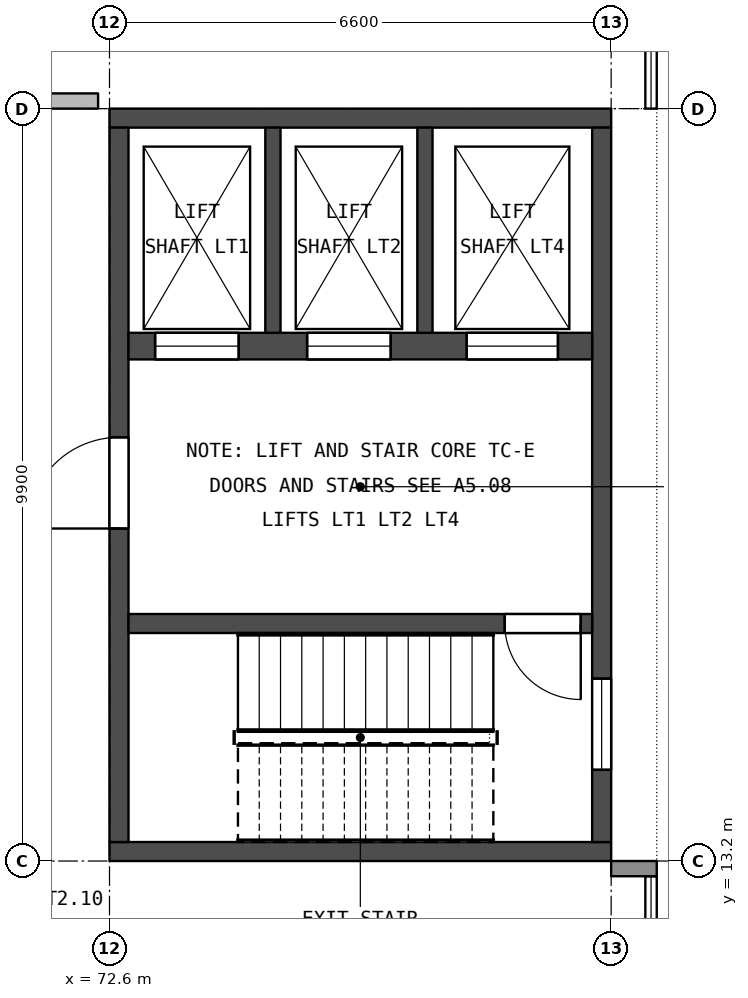
"""IFC4 building model, lengths in metres.
Left out: names, types, materials, properties, quantities, classifications, styles, units other than length and angle.
Written with IfcOpenShell. Run it as: python <this file> out.ifc"""

import sys

from ifc_helpers import new_model, si_unit, direction, frame, frame_2d, origin, place, context, subcontext, project, spatial, rectangle, extrude, element, fill, save


model = new_model("IFC4")
c1 = context("Model", 3, precision=1e-05, world=origin(), true_north=direction((0.0, 1.0)))
c2 = subcontext(c1, "Body", "Model", "MODEL_VIEW")
j1 = project(units=[si_unit("LENGTHUNIT", "METRE"), si_unit("PLANEANGLEUNIT", "RADIAN")], contexts=[c1])
p1 = place(None, origin())
s1 = spatial("IfcSite", under=j1, at=p1, CompositionType="ELEMENT")
p2 = place(p1, origin())
s2 = spatial("IfcBuilding", under=s1, at=p2, CompositionType="ELEMENT")
p3 = place(p2, frame((0.0, 0.0, 9.9)))
s3 = spatial("IfcBuildingStorey", under=s2, at=p3, CompositionType="ELEMENT", Elevation=9.9)
for number, where, z_axis, x_axis in (
    (1, (72.6, 13.325, 0.0), (0.0, 0.0, 1.0), (1.0, 0.0, 0.0)),
    (2, (72.6, 22.975, 0.0), (0.0, 0.0, 1.0), (1.0, 0.0, 0.0)),
):
    element("IfcWall", number, at=place(p3, frame(where, z_axis=z_axis, x_axis=x_axis)), inside=s3, PredefinedType="SHEAR", context=c2, shape_type="SweptSolid", body=[
        extrude(rectangle(XDim=6.6, YDim=0.25, at=frame_2d((3.3, 0.0))), origin(), (0.0, 0.0, 1.0), 4.2),
    ])
p4 = place(p3, frame((72.725, 13.45, 0.0), z_axis=(0.0, 0.0, 1.0), x_axis=(0.0, 1.0, 0.0)))
e3 = element("IfcWall", 3, at=p4, inside=s3, PredefinedType="SHEAR", context=c2, shape_type="SweptSolid", body=[
    extrude(rectangle(XDim=9.4, YDim=0.25, at=frame_2d((4.7, 0.0))), origin(), (0.0, 0.0, 1.0), 4.2),
])
p5 = place(p4, frame((4.125, 0.0, 0.0)))
e4 = element("IfcOpeningElement", 4, at=p5, cuts=e3, PredefinedType="OPENING", context=c2, shape_type="SweptSolid", body=[
    extrude(rectangle(XDim=1.2, YDim=2.1, at=frame_2d((0.6, 1.05))), frame((0.0, 0.135, 0.0), z_axis=(0.0, -1.0, 0.0), x_axis=(1.0, 0.0, 0.0)), (0.0, 0.0, 1.0), 0.27),
])
p6 = place(p3, frame((79.075, 13.45, 0.0), z_axis=(0.0, 0.0, 1.0), x_axis=(0.0, 1.0, 0.0)))
e5 = element("IfcWall", 5, at=p6, inside=s3, PredefinedType="SHEAR", context=c2, shape_type="SweptSolid", body=[
    extrude(rectangle(XDim=9.4, YDim=0.25, at=frame_2d((4.7, 0.0))), origin(), (0.0, 0.0, 1.0), 4.2),
])
p7 = place(p6, frame((0.95, 0.0, 0.7)))
e6 = element("IfcOpeningElement", 6, at=p7, cuts=e5, PredefinedType="OPENING", context=c2, shape_type="SweptSolid", body=[
    extrude(rectangle(XDim=1.2, YDim=1.8, at=frame_2d((0.6, 0.9))), frame((0.0, 0.135, 0.0), z_axis=(0.0, -1.0, 0.0), x_axis=(1.0, 0.0, 0.0)), (0.0, 0.0, 1.0), 0.27),
])
p8 = place(p3, frame((72.85, 16.325, 0.0), z_axis=(0.0, 0.0, 1.0), x_axis=(1.0, 0.0, 0.0)))
e7 = element("IfcWall", 7, at=p8, inside=s3, PredefinedType="SHEAR", context=c2, shape_type="SweptSolid", body=[
    extrude(rectangle(XDim=6.1, YDim=0.25, at=frame_2d((3.05, 0.0))), origin(), (0.0, 0.0, 1.0), 4.2),
])
p9 = place(p8, frame((4.95, 0.0, 0.0)))
e8 = element("IfcOpeningElement", 8, at=p9, cuts=e7, PredefinedType="OPENING", context=c2, shape_type="SweptSolid", body=[
    extrude(rectangle(XDim=1.0, YDim=2.2, at=frame_2d((0.5, 1.1))), frame((0.0, 0.135, 0.0), z_axis=(0.0, -1.0, 0.0), x_axis=(1.0, 0.0, 0.0)), (0.0, 0.0, 1.0), 0.27),
])
p10 = place(p3, frame((72.85, 19.975, 0.0), z_axis=(0.0, 0.0, 1.0), x_axis=(1.0, 0.0, 0.0)))
e9 = element("IfcWall", 9, at=p10, inside=s3, PredefinedType="SHEAR", context=c2, shape_type="SweptSolid", body=[
    extrude(rectangle(XDim=6.1, YDim=0.35, at=frame_2d((3.05, 0.0))), origin(), (0.0, 0.0, 1.0), 4.2),
])
p11 = place(p10, frame((0.35, 0.0, 0.0)))
e10 = element("IfcOpeningElement", 10, at=p11, cuts=e9, PredefinedType="OPENING", context=c2, shape_type="SweptSolid", body=[
    extrude(rectangle(XDim=1.1, YDim=2.2, at=frame_2d((0.55, 1.1))), frame((0.0, 0.185, 0.0), z_axis=(0.0, -1.0, 0.0), x_axis=(1.0, 0.0, 0.0)), (0.0, 0.0, 1.0), 0.37),
])
p12 = place(p10, frame((2.35, 0.0, 0.0)))
e11 = element("IfcOpeningElement", 11, at=p12, cuts=e9, PredefinedType="OPENING", context=c2, shape_type="SweptSolid", body=[
    extrude(rectangle(XDim=1.1, YDim=2.2, at=frame_2d((0.55, 1.1))), frame((0.0, 0.185, 0.0), z_axis=(0.0, -1.0, 0.0), x_axis=(1.0, 0.0, 0.0)), (0.0, 0.0, 1.0), 0.37),
])
p13 = place(p10, frame((4.45, 0.0, 0.0)))
e12 = element("IfcOpeningElement", 12, at=p13, cuts=e9, PredefinedType="OPENING", context=c2, shape_type="SweptSolid", body=[
    extrude(rectangle(XDim=1.2, YDim=2.3, at=frame_2d((0.6, 1.15))), frame((0.0, 0.185, 0.0), z_axis=(0.0, -1.0, 0.0), x_axis=(1.0, 0.0, 0.0)), (0.0, 0.0, 1.0), 0.37),
])
for number, where, z_axis, x_axis in (
    (13, (74.75, 20.15, 0.0), (0.0, 0.0, 1.0), (0.0, 1.0, 0.0)),
    (14, (76.75, 20.15, 0.0), (0.0, 0.0, 1.0), (0.0, 1.0, 0.0)),
):
    element("IfcWall", number, at=place(p3, frame(where, z_axis=z_axis, x_axis=x_axis)), inside=s3, PredefinedType="SHEAR", context=c2, shape_type="SweptSolid", body=[
        extrude(rectangle(XDim=2.7, YDim=0.2, at=frame_2d((1.35, 0.0))), origin(), (0.0, 0.0, 1.0), 4.2),
    ])
p14 = place(p3, frame((79.2, 13.1, 0.0), z_axis=(0.0, 0.0, 1.0), x_axis=(1.0, 0.0, 0.0)))
e15 = element("IfcWall", 15, at=p14, inside=s3, PredefinedType="STANDARD", context=c2, shape_type="SweptSolid", body=[
    extrude(rectangle(XDim=0.6, YDim=0.2, at=frame_2d((0.3, 0.0))), origin(), (0.0, 0.0, 1.0), 3.5),
])
p15 = place(p3, frame((66.45, 23.2, 0.0), z_axis=(0.0, 0.0, 1.0), x_axis=(1.0, 0.0, 0.0)))
e16 = element("IfcWall", 16, at=p15, inside=s3, PredefinedType="PARTITIONING", context=c2, shape_type="SweptSolid", body=[
    extrude(rectangle(XDim=6.0, YDim=0.2, at=frame_2d((3.0, 0.0))), origin(), (0.0, 0.0, 1.0), 3.5),
])
p16 = place(p5, origin())
e17 = element("IfcDoor", 17, at=p16, inside=s3, OperationType="SINGLE_SWING_LEFT", PredefinedType="DOOR", context=c2, shape_type="SweptSolid", body=[
    extrude(rectangle(XDim=1.2, YDim=2.1, at=frame_2d((0.6, 1.05))), frame((0.0, 0.025, 0.0), z_axis=(0.0, -1.0, 0.0), x_axis=(1.0, 0.0, 0.0)), (0.0, 0.0, 1.0), 0.05),
])
fill(e4, e17)
p17 = place(p9, origin())
e18 = element("IfcDoor", 18, at=p17, inside=s3, OperationType="SINGLE_SWING_RIGHT", PredefinedType="DOOR", context=c2, shape_type="SweptSolid", body=[
    extrude(rectangle(XDim=1.0, YDim=2.2, at=frame_2d((0.5, 1.1))), frame((0.0, 0.025, 0.0), z_axis=(0.0, -1.0, 0.0), x_axis=(1.0, 0.0, 0.0)), (0.0, 0.0, 1.0), 0.05),
])
fill(e8, e18)
p18 = place(p11, origin())
e19 = element("IfcDoor", 19, at=p18, inside=s3, OperationType="DOUBLE_DOOR_SLIDING", PredefinedType="NOTDEFINED", context=c2, shape_type="SweptSolid", body=[
    extrude(rectangle(XDim=1.1, YDim=2.2, at=frame_2d((0.55, 1.1))), frame((0.0, 0.025, 0.0), z_axis=(0.0, -1.0, 0.0), x_axis=(1.0, 0.0, 0.0)), (0.0, 0.0, 1.0), 0.05),
])
fill(e10, e19)
p19 = place(p12, origin())
e20 = element("IfcDoor", 20, at=p19, inside=s3, OperationType="DOUBLE_DOOR_SLIDING", PredefinedType="NOTDEFINED", context=c2, shape_type="SweptSolid", body=[
    extrude(rectangle(XDim=1.1, YDim=2.2, at=frame_2d((0.55, 1.1))), frame((0.0, 0.025, 0.0), z_axis=(0.0, -1.0, 0.0), x_axis=(1.0, 0.0, 0.0)), (0.0, 0.0, 1.0), 0.05),
])
fill(e11, e20)
p20 = place(p13, origin())
e21 = element("IfcDoor", 21, at=p20, inside=s3, OperationType="DOUBLE_DOOR_SLIDING", PredefinedType="NOTDEFINED", context=c2, shape_type="SweptSolid", body=[
    extrude(rectangle(XDim=1.2, YDim=2.3, at=frame_2d((0.6, 1.15))), frame((0.0, 0.025, 0.0), z_axis=(0.0, -1.0, 0.0), x_axis=(1.0, 0.0, 0.0)), (0.0, 0.0, 1.0), 0.05),
])
fill(e12, e21)
p21 = place(p7, origin())
e22 = element("IfcWindow", 22, at=p21, inside=s3, PartitioningType="SINGLE_PANEL", PredefinedType="WINDOW", context=c2, shape_type="SweptSolid", body=[
    extrude(rectangle(XDim=1.2, YDim=1.8, at=frame_2d((0.6, 0.9))), frame((0.0, 0.03, 0.0), z_axis=(0.0, -1.0, 0.0), x_axis=(1.0, 0.0, 0.0)), (0.0, 0.0, 1.0), 0.06),
])
fill(e6, e22)
save(model, sys.argv[1])
